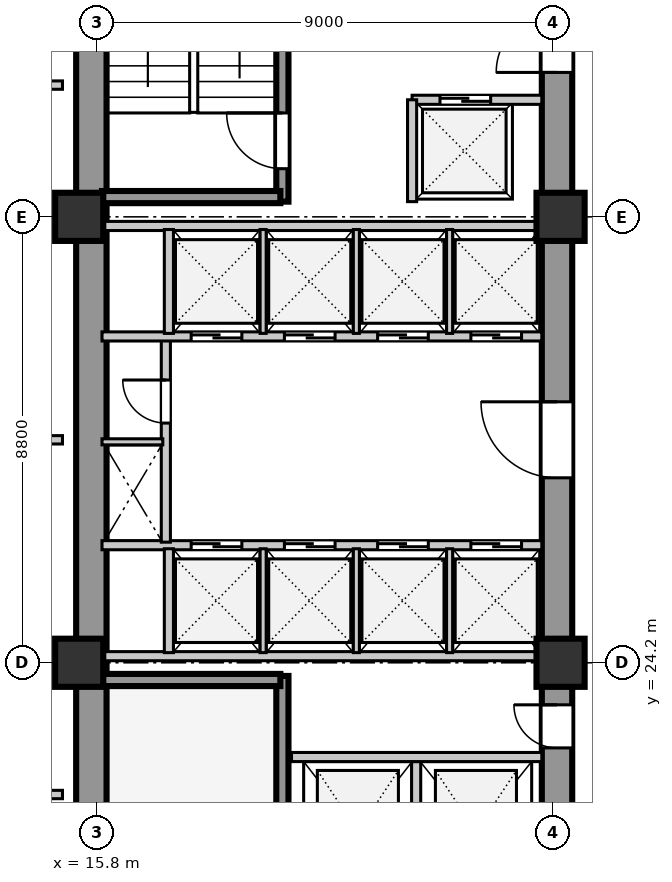
"""IFC4 building model, lengths in metres.
Left out: names, types, materials, properties, quantities, classifications, styles, units other than length and angle.
Written with IfcOpenShell. Run it as: python <this file> out.ifc"""

import sys

from ifc_helpers import new_model, si_unit, direction, frame, frame_2d, origin, origin_2d, place, context, subcontext, project, spatial, rectangle, extrude, element, fill, save


model = new_model("IFC4")
c1 = context("Model", 3, precision=1e-05, world=origin(), true_north=direction((0.0, 1.0)))
c2 = subcontext(c1, "Body", "Model", "MODEL_VIEW")
j1 = project(units=[si_unit("LENGTHUNIT", "METRE"), si_unit("PLANEANGLEUNIT", "RADIAN")], contexts=[c1])
p1 = place(None, origin())
s1 = spatial("IfcSite", under=j1, at=p1, CompositionType="ELEMENT")
p2 = place(p1, origin())
s2 = spatial("IfcBuilding", under=s1, at=p2, CompositionType="ELEMENT")
p3 = place(p2, frame((0.0, 0.0, 17.0)))
s3 = spatial("IfcBuildingStorey", under=s2, at=p3, CompositionType="ELEMENT", Elevation=17.0)
p4 = place(p3, frame((15.69, 15.81, 0.0), z_axis=(0.0, 0.0, 1.0), x_axis=(0.0, 1.0, 0.0)))
e1 = element("IfcWall", 1, at=p4, inside=s3, PredefinedType="SHEAR", context=c2, shape_type="SweptSolid", body=[
    extrude(rectangle(XDim=25.63, YDim=0.6, at=frame_2d((12.815, 0.0))), origin(), (0.0, 0.0, 1.0), 4.22),
])
p5 = place(p3, frame((24.88, 15.74, 0.0), z_axis=(0.0, 0.0, 1.0), x_axis=(0.0, 1.0, 0.0)))
e2 = element("IfcWall", 2, at=p5, inside=s3, PredefinedType="SHEAR", context=c2, shape_type="SweptSolid", body=[
    extrude(rectangle(XDim=25.76, YDim=0.6, at=frame_2d((12.88, 0.0))), origin(), (0.0, 0.0, 1.0), 4.22),
])
p6 = place(p5, frame((1.61, 0.0, 0.0)))
e3 = element("IfcOpeningElement", 3, at=p6, cuts=e2, PredefinedType="OPENING", context=c2, shape_type="SweptSolid", body=[
    extrude(rectangle(XDim=1.2, YDim=2.1, at=frame_2d((0.6, 1.05))), frame((0.0, 0.31, 0.0), z_axis=(0.0, -1.0, 0.0), x_axis=(1.0, 0.0, 0.0)), (0.0, 0.0, 1.0), 0.62),
])
p7 = place(p5, frame((6.78, 0.0, 0.0)))
e4 = element("IfcOpeningElement", 4, at=p7, cuts=e2, PredefinedType="OPENING", context=c2, shape_type="SweptSolid", body=[
    extrude(rectangle(XDim=0.85, YDim=2.06, at=frame_2d((0.425, 1.03))), frame((0.0, 0.31, 0.0), z_axis=(0.0, -1.0, 0.0), x_axis=(1.0, 0.0, 0.0)), (0.0, 0.0, 1.0), 0.62),
])
p8 = place(p5, frame((12.11, 0.0, 0.0)))
e5 = element("IfcOpeningElement", 5, at=p8, cuts=e2, PredefinedType="OPENING", context=c2, shape_type="SweptSolid", body=[
    extrude(rectangle(XDim=1.5, YDim=2.12, at=frame_2d((0.75, 1.06))), frame((0.0, 0.31, 0.0), z_axis=(0.0, -1.0, 0.0), x_axis=(1.0, 0.0, 0.0)), (0.0, 0.0, 1.0), 0.62),
])
p9 = place(p5, frame((20.11, 0.0, 0.0)))
e6 = element("IfcOpeningElement", 6, at=p9, cuts=e2, PredefinedType="OPENING", context=c2, shape_type="SweptSolid", body=[
    extrude(rectangle(XDim=1.2, YDim=2.12, at=frame_2d((0.6, 1.06))), frame((0.0, 0.31, 0.0), z_axis=(0.0, -1.0, 0.0), x_axis=(1.0, 0.0, 0.0)), (0.0, 0.0, 1.0), 0.62),
])
p10 = place(p5, frame((24.01, 0.0, 0.0)))
e7 = element("IfcOpeningElement", 7, at=p10, cuts=e2, PredefinedType="OPENING", context=c2, shape_type="SweptSolid", body=[
    extrude(rectangle(XDim=0.95, YDim=2.1, at=frame_2d((0.475, 1.05))), frame((0.0, 0.31, 0.0), z_axis=(0.0, -1.0, 0.0), x_axis=(1.0, 0.0, 0.0)), (0.0, 0.0, 1.0), 0.62),
])
for number, where, z_axis, x_axis in (
    (8, (15.45, 24.2, 0.0), (0.0, 0.0, 1.0), (1.0, 0.0, 0.0)),
    (9, (15.45, 33.0, 0.0), (0.0, 0.0, 1.0), (1.0, 0.0, 0.0)),
    (10, (24.95, 24.2, 0.0), (0.0, 0.0, 1.0), (1.0, 0.0, 0.0)),
    (11, (24.95, 33.0, 0.0), (0.0, 0.0, 1.0), (1.0, 0.0, 0.0)),
):
    element("IfcColumn", number, at=place(p3, frame(where, z_axis=z_axis, x_axis=x_axis)), inside=s3, PredefinedType="COLUMN", context=c2, shape_type="SweptSolid", body=[
        extrude(rectangle(XDim=0.95, YDim=0.95, at=origin_2d()), origin(), (0.0, 0.0, 1.0), 4.22),
    ])
p11 = place(p3, frame((19.46, 15.74, 0.0), z_axis=(0.0, 0.0, 1.0), x_axis=(0.0, 1.0, 0.0)))
e12 = element("IfcWall", 12, at=p11, inside=s3, PredefinedType="SHEAR", context=c2, shape_type="SweptSolid", body=[
    extrude(rectangle(XDim=8.2, YDim=0.24, at=frame_2d((4.1, 0.0))), origin(), (0.0, 0.0, 1.0), 4.5),
])
p12 = place(p11, frame((0.45, 0.0, 0.0)))
e13 = element("IfcOpeningElement", 13, at=p12, cuts=e12, PredefinedType="OPENING", context=c2, shape_type="SweptSolid", body=[
    extrude(rectangle(XDim=1.1, YDim=2.1, at=frame_2d((0.55, 1.05))), frame((0.0, 0.13, 0.0), z_axis=(0.0, -1.0, 0.0), x_axis=(1.0, 0.0, 0.0)), (0.0, 0.0, 1.0), 0.26),
])
p13 = place(p3, frame((15.9, 23.86, 0.0), z_axis=(0.0, 0.0, 1.0), x_axis=(1.0, 0.0, 0.0)))
e14 = element("IfcWall", 14, at=p13, inside=s3, PredefinedType="SHEAR", context=c2, shape_type="SweptSolid", body=[
    extrude(rectangle(XDim=3.52, YDim=0.24, at=frame_2d((1.76, 0.0))), origin(), (0.0, 0.0, 1.0), 4.5),
])
p14 = place(p3, frame((22.1, 19.51, 0.0), z_axis=(0.0, 0.0, 1.0), x_axis=(0.0, 1.0, 0.0)))
e15 = element("IfcWall", 15, at=p14, inside=s3, PredefinedType="SOLIDWALL", context=c2, shape_type="SweptSolid", body=[
    extrude(rectangle(XDim=2.74, YDim=0.18, at=frame_2d((1.37, 0.0))), origin(), (0.0, 0.0, 1.0), 4.22),
])
p15 = place(p3, frame((19.64, 22.34, 0.0), z_axis=(0.0, 0.0, 1.0), x_axis=(1.0, 0.0, 0.0)))
e16 = element("IfcWall", 16, at=p15, inside=s3, PredefinedType="SOLIDWALL", context=c2, shape_type="SweptSolid", body=[
    extrude(rectangle(XDim=4.94, YDim=0.18, at=frame_2d((2.47, 0.0))), origin(), (0.0, 0.0, 1.0), 4.22),
])
p16 = place(p3, frame((15.9, 26.52, 0.0), z_axis=(0.0, 0.0, 1.0), x_axis=(1.0, 0.0, 0.0)))
e17 = element("IfcWall", 17, at=p16, inside=s3, PredefinedType="SOLIDWALL", context=c2, shape_type="SweptSolid", body=[
    extrude(rectangle(XDim=8.68, YDim=0.18, at=frame_2d((4.34, 0.0))), origin(), (0.0, 0.0, 1.0), 4.22),
])
p17 = place(p16, frame((1.76, 0.0, 0.0)))
e18 = element("IfcOpeningElement", 18, at=p17, cuts=e17, PredefinedType="OPENING", context=c2, shape_type="SweptSolid", body=[
    extrude(rectangle(XDim=1.0, YDim=2.1, at=frame_2d((0.5, 1.05))), frame((0.0, 0.1, 0.0), z_axis=(0.0, -1.0, 0.0), x_axis=(1.0, 0.0, 0.0)), (0.0, 0.0, 1.0), 0.2),
])
p18 = place(p16, frame((3.6, 0.0, 0.0)))
e19 = element("IfcOpeningElement", 19, at=p18, cuts=e17, PredefinedType="OPENING", context=c2, shape_type="SweptSolid", body=[
    extrude(rectangle(XDim=1.0, YDim=2.1, at=frame_2d((0.5, 1.05))), frame((0.0, 0.1, 0.0), z_axis=(0.0, -1.0, 0.0), x_axis=(1.0, 0.0, 0.0)), (0.0, 0.0, 1.0), 0.2),
])
p19 = place(p16, frame((5.44, 0.0, 0.0)))
e20 = element("IfcOpeningElement", 20, at=p19, cuts=e17, PredefinedType="OPENING", context=c2, shape_type="SweptSolid", body=[
    extrude(rectangle(XDim=1.0, YDim=2.1, at=frame_2d((0.5, 1.05))), frame((0.0, 0.1, 0.0), z_axis=(0.0, -1.0, 0.0), x_axis=(1.0, 0.0, 0.0)), (0.0, 0.0, 1.0), 0.2),
])
p20 = place(p16, frame((7.28, 0.0, 0.0)))
e21 = element("IfcOpeningElement", 21, at=p20, cuts=e17, PredefinedType="OPENING", context=c2, shape_type="SweptSolid", body=[
    extrude(rectangle(XDim=1.0, YDim=2.1, at=frame_2d((0.5, 1.05))), frame((0.0, 0.1, 0.0), z_axis=(0.0, -1.0, 0.0), x_axis=(1.0, 0.0, 0.0)), (0.0, 0.0, 1.0), 0.2),
])
p21 = place(p3, frame((15.9, 24.33, 0.0), z_axis=(0.0, 0.0, 1.0), x_axis=(1.0, 0.0, 0.0)))
e22 = element("IfcWall", 22, at=p21, inside=s3, PredefinedType="SOLIDWALL", context=c2, shape_type="SweptSolid", body=[
    extrude(rectangle(XDim=8.68, YDim=0.18, at=frame_2d((4.34, 0.0))), origin(), (0.0, 0.0, 1.0), 3.42),
])
p22 = place(p3, frame((17.22, 24.4, 0.0), z_axis=(0.0, 0.0, 1.0), x_axis=(0.0, 1.0, 0.0)))
e23 = element("IfcWall", 23, at=p22, inside=s3, PredefinedType="SOLIDWALL", context=c2, shape_type="SweptSolid", body=[
    extrude(rectangle(XDim=2.05, YDim=0.18, at=frame_2d((1.025, 0.0))), origin(), (0.0, 0.0, 1.0), 4.22),
])
for number, where, z_axis, x_axis in (
    (24, (19.08, 24.4, 0.0), (0.0, 0.0, 1.0), (0.0, 1.0, 0.0)),
    (25, (20.92, 24.4, 0.0), (0.0, 0.0, 1.0), (0.0, 1.0, 0.0)),
    (26, (22.76, 24.4, 0.0), (0.0, 0.0, 1.0), (0.0, 1.0, 0.0)),
):
    element("IfcWall", number, at=place(p3, frame(where, z_axis=z_axis, x_axis=x_axis)), inside=s3, PredefinedType="PARTITIONING", context=c2, shape_type="SweptSolid", body=[
        extrude(rectangle(XDim=2.05, YDim=0.12, at=frame_2d((1.025, 0.0))), origin(), (0.0, 0.0, 1.0), 4.22),
    ])
p23 = place(p3, frame((17.16, 26.58, 0.0), z_axis=(0.0, 0.0, 1.0), x_axis=(0.0, 1.0, 0.0)))
e27 = element("IfcWall", 27, at=p23, inside=s3, PredefinedType="SOLIDWALL", context=c2, shape_type="SweptSolid", body=[
    extrude(rectangle(XDim=4.02, YDim=0.18, at=frame_2d((2.01, 0.0))), origin(), (0.0, 0.0, 1.0), 4.22),
])
p24 = place(p23, frame((2.35, 0.0, 0.0)))
e28 = element("IfcOpeningElement", 28, at=p24, cuts=e27, PredefinedType="OPENING", context=c2, shape_type="SweptSolid", body=[
    extrude(rectangle(XDim=0.85, YDim=2.06, at=frame_2d((0.425, 1.03))), frame((0.0, 0.1, 0.0), z_axis=(0.0, -1.0, 0.0), x_axis=(1.0, 0.0, 0.0)), (0.0, 0.0, 1.0), 0.2),
])
p25 = place(p3, frame((15.9, 28.56, 0.0), z_axis=(0.0, 0.0, 1.0), x_axis=(1.0, 0.0, 0.0)))
e29 = element("IfcWall", 29, at=p25, inside=s3, PredefinedType="PARTITIONING", context=c2, shape_type="SweptSolid", body=[
    extrude(rectangle(XDim=1.2, YDim=0.12, at=frame_2d((0.6, 0.0))), origin(), (0.0, 0.0, 1.0), 4.22),
])
p26 = place(p3, frame((15.9, 30.64, 0.0), z_axis=(0.0, 0.0, 1.0), x_axis=(1.0, 0.0, 0.0)))
e30 = element("IfcWall", 30, at=p26, inside=s3, PredefinedType="SOLIDWALL", context=c2, shape_type="SweptSolid", body=[
    extrude(rectangle(XDim=8.68, YDim=0.18, at=frame_2d((4.34, 0.0))), origin(), (0.0, 0.0, 1.0), 4.22),
])
p27 = place(p26, frame((1.76, 0.0, 0.0)))
e31 = element("IfcOpeningElement", 31, at=p27, cuts=e30, PredefinedType="OPENING", context=c2, shape_type="SweptSolid", body=[
    extrude(rectangle(XDim=1.0, YDim=2.1, at=frame_2d((0.5, 1.05))), frame((0.0, 0.1, 0.0), z_axis=(0.0, -1.0, 0.0), x_axis=(1.0, 0.0, 0.0)), (0.0, 0.0, 1.0), 0.2),
])
p28 = place(p26, frame((3.6, 0.0, 0.0)))
e32 = element("IfcOpeningElement", 32, at=p28, cuts=e30, PredefinedType="OPENING", context=c2, shape_type="SweptSolid", body=[
    extrude(rectangle(XDim=1.0, YDim=2.1, at=frame_2d((0.5, 1.05))), frame((0.0, 0.1, 0.0), z_axis=(0.0, -1.0, 0.0), x_axis=(1.0, 0.0, 0.0)), (0.0, 0.0, 1.0), 0.2),
])
p29 = place(p26, frame((5.44, 0.0, 0.0)))
e33 = element("IfcOpeningElement", 33, at=p29, cuts=e30, PredefinedType="OPENING", context=c2, shape_type="SweptSolid", body=[
    extrude(rectangle(XDim=1.0, YDim=2.1, at=frame_2d((0.5, 1.05))), frame((0.0, 0.1, 0.0), z_axis=(0.0, -1.0, 0.0), x_axis=(1.0, 0.0, 0.0)), (0.0, 0.0, 1.0), 0.2),
])
p30 = place(p26, frame((7.28, 0.0, 0.0)))
e34 = element("IfcOpeningElement", 34, at=p30, cuts=e30, PredefinedType="OPENING", context=c2, shape_type="SweptSolid", body=[
    extrude(rectangle(XDim=1.0, YDim=2.1, at=frame_2d((0.5, 1.05))), frame((0.0, 0.1, 0.0), z_axis=(0.0, -1.0, 0.0), x_axis=(1.0, 0.0, 0.0)), (0.0, 0.0, 1.0), 0.2),
])
p31 = place(p3, frame((15.9, 32.82, 0.0), z_axis=(0.0, 0.0, 1.0), x_axis=(1.0, 0.0, 0.0)))
e35 = element("IfcWall", 35, at=p31, inside=s3, PredefinedType="SOLIDWALL", context=c2, shape_type="SweptSolid", body=[
    extrude(rectangle(XDim=8.68, YDim=0.18, at=frame_2d((4.34, 0.0))), origin(), (0.0, 0.0, 1.0), 3.42),
])
p32 = place(p3, frame((17.22, 30.7, 0.0), z_axis=(0.0, 0.0, 1.0), x_axis=(0.0, 1.0, 0.0)))
e36 = element("IfcWall", 36, at=p32, inside=s3, PredefinedType="SOLIDWALL", context=c2, shape_type="SweptSolid", body=[
    extrude(rectangle(XDim=2.05, YDim=0.18, at=frame_2d((1.025, 0.0))), origin(), (0.0, 0.0, 1.0), 4.22),
])
for number, where, z_axis, x_axis in (
    (37, (19.08, 30.7, 0.0), (0.0, 0.0, 1.0), (0.0, 1.0, 0.0)),
    (38, (20.92, 30.7, 0.0), (0.0, 0.0, 1.0), (0.0, 1.0, 0.0)),
    (39, (22.76, 30.7, 0.0), (0.0, 0.0, 1.0), (0.0, 1.0, 0.0)),
):
    element("IfcWall", number, at=place(p3, frame(where, z_axis=z_axis, x_axis=x_axis)), inside=s3, PredefinedType="PARTITIONING", context=c2, shape_type="SweptSolid", body=[
        extrude(rectangle(XDim=2.05, YDim=0.12, at=frame_2d((1.025, 0.0))), origin(), (0.0, 0.0, 1.0), 4.22),
    ])
p33 = place(p3, frame((19.46, 33.3, 0.0), z_axis=(0.0, 0.0, 1.0), x_axis=(0.0, 1.0, 0.0)))
e40 = element("IfcWall", 40, at=p33, inside=s3, PredefinedType="SHEAR", context=c2, shape_type="SweptSolid", body=[
    extrude(rectangle(XDim=8.18, YDim=0.24, at=frame_2d((4.09, 0.0))), origin(), (0.0, 0.0, 1.0), 4.5),
])
p34 = place(p33, frame((0.65, 0.0, 0.0)))
e41 = element("IfcOpeningElement", 41, at=p34, cuts=e40, PredefinedType="OPENING", context=c2, shape_type="SweptSolid", body=[
    extrude(rectangle(XDim=1.1, YDim=2.1, at=frame_2d((0.55, 1.05))), frame((0.0, 0.13, 0.0), z_axis=(0.0, -1.0, 0.0), x_axis=(1.0, 0.0, 0.0)), (0.0, 0.0, 1.0), 0.26),
])
p35 = place(p3, frame((15.9, 33.39, 0.0), z_axis=(0.0, 0.0, 1.0), x_axis=(1.0, 0.0, 0.0)))
e42 = element("IfcWall", 42, at=p35, inside=s3, PredefinedType="SHEAR", context=c2, shape_type="SweptSolid", body=[
    extrude(rectangle(XDim=3.52, YDim=0.24, at=frame_2d((1.76, 0.0))), origin(), (0.0, 0.0, 1.0), 4.5),
])
p36 = place(p3, frame((22.02, 35.31, 0.0), z_axis=(0.0, 0.0, 1.0), x_axis=(1.0, 0.0, 0.0)))
e43 = element("IfcWall", 43, at=p36, inside=s3, PredefinedType="SOLIDWALL", context=c2, shape_type="SweptSolid", body=[
    extrude(rectangle(XDim=2.56, YDim=0.18, at=frame_2d((1.28, 0.0))), origin(), (0.0, 0.0, 1.0), 4.22),
])
p37 = place(p36, frame((0.55, 0.0, 0.0)))
e44 = element("IfcOpeningElement", 44, at=p37, cuts=e43, PredefinedType="OPENING", context=c2, shape_type="SweptSolid", body=[
    extrude(rectangle(XDim=1.0, YDim=2.1, at=frame_2d((0.5, 1.05))), frame((0.0, 0.1, 0.0), z_axis=(0.0, -1.0, 0.0), x_axis=(1.0, 0.0, 0.0)), (0.0, 0.0, 1.0), 0.2),
])
p38 = place(p3, frame((22.02, 33.3, 0.0), z_axis=(0.0, 0.0, 1.0), x_axis=(0.0, 1.0, 0.0)))
e45 = element("IfcWall", 45, at=p38, inside=s3, PredefinedType="SOLIDWALL", context=c2, shape_type="SweptSolid", body=[
    extrude(rectangle(XDim=2.01, YDim=0.18, at=frame_2d((1.005, 0.0))), origin(), (0.0, 0.0, 1.0), 4.22),
])
for number, where, z_axis, x_axis in (
    (46, (6.88, 21.6, 0.0), (0.0, 0.0, 1.0), (1.0, 0.0, 0.0)),
    (47, (6.88, 28.6, 0.0), (0.0, 0.0, 1.0), (1.0, 0.0, 0.0)),
    (48, (6.88, 35.6, 0.0), (0.0, 0.0, 1.0), (1.0, 0.0, 0.0)),
):
    element("IfcWall", number, at=place(p3, frame(where, z_axis=z_axis, x_axis=x_axis)), inside=s3, PredefinedType="PARTITIONING", context=c2, shape_type="SweptSolid", body=[
        extrude(rectangle(XDim=8.24, YDim=0.165, at=frame_2d((4.12, 0.0))), origin(), (0.0, 0.0, 1.0), 4.22),
    ])
p39 = place(p7, frame((0.85, 0.0, 0.0), z_axis=(0.0, 0.0, 1.0), x_axis=(-1.0, 0.0, 0.0)))
e49 = element("IfcDoor", 49, at=p39, inside=s3, OperationType="SINGLE_SWING_LEFT", PredefinedType="DOOR", context=c2, shape_type="SweptSolid", body=[
    extrude(rectangle(XDim=0.85, YDim=2.06, at=frame_2d((0.425, 1.03))), frame((0.0, 0.025, 0.0), z_axis=(0.0, -1.0, 0.0), x_axis=(1.0, 0.0, 0.0)), (0.0, 0.0, 1.0), 0.05),
])
fill(e4, e49)
p40 = place(p17, origin())
e50 = element("IfcDoor", 50, at=p40, inside=s3, OperationType="DOUBLE_DOOR_SLIDING", PredefinedType="DOOR", context=c2, shape_type="SweptSolid", body=[
    extrude(rectangle(XDim=1.0, YDim=2.1, at=frame_2d((0.5, 1.05))), frame((0.0, 0.025, 0.0), z_axis=(0.0, -1.0, 0.0), x_axis=(1.0, 0.0, 0.0)), (0.0, 0.0, 1.0), 0.05),
])
fill(e18, e50)
p41 = place(p18, origin())
e51 = element("IfcDoor", 51, at=p41, inside=s3, OperationType="DOUBLE_DOOR_SLIDING", PredefinedType="DOOR", context=c2, shape_type="SweptSolid", body=[
    extrude(rectangle(XDim=1.0, YDim=2.1, at=frame_2d((0.5, 1.05))), frame((0.0, 0.025, 0.0), z_axis=(0.0, -1.0, 0.0), x_axis=(1.0, 0.0, 0.0)), (0.0, 0.0, 1.0), 0.05),
])
fill(e19, e51)
p42 = place(p19, origin())
e52 = element("IfcDoor", 52, at=p42, inside=s3, OperationType="DOUBLE_DOOR_SLIDING", PredefinedType="DOOR", context=c2, shape_type="SweptSolid", body=[
    extrude(rectangle(XDim=1.0, YDim=2.1, at=frame_2d((0.5, 1.05))), frame((0.0, 0.025, 0.0), z_axis=(0.0, -1.0, 0.0), x_axis=(1.0, 0.0, 0.0)), (0.0, 0.0, 1.0), 0.05),
])
fill(e20, e52)
p43 = place(p20, origin())
e53 = element("IfcDoor", 53, at=p43, inside=s3, OperationType="DOUBLE_DOOR_SLIDING", PredefinedType="DOOR", context=c2, shape_type="SweptSolid", body=[
    extrude(rectangle(XDim=1.0, YDim=2.1, at=frame_2d((0.5, 1.05))), frame((0.0, 0.025, 0.0), z_axis=(0.0, -1.0, 0.0), x_axis=(1.0, 0.0, 0.0)), (0.0, 0.0, 1.0), 0.05),
])
fill(e21, e53)
p44 = place(p24, origin())
e54 = element("IfcDoor", 54, at=p44, inside=s3, OperationType="SINGLE_SWING_RIGHT", PredefinedType="DOOR", context=c2, shape_type="SweptSolid", body=[
    extrude(rectangle(XDim=0.85, YDim=2.06, at=frame_2d((0.425, 1.03))), frame((0.0, 0.025, 0.0), z_axis=(0.0, -1.0, 0.0), x_axis=(1.0, 0.0, 0.0)), (0.0, 0.0, 1.0), 0.05),
])
fill(e28, e54)
p45 = place(p8, frame((1.5, 0.0, 0.0), z_axis=(0.0, 0.0, 1.0), x_axis=(-1.0, 0.0, 0.0)))
e55 = element("IfcDoor", 55, at=p45, inside=s3, OperationType="SINGLE_SWING_LEFT", PredefinedType="DOOR", context=c2, shape_type="SweptSolid", body=[
    extrude(rectangle(XDim=1.5, YDim=2.12, at=frame_2d((0.75, 1.06))), frame((0.0, 0.025, 0.0), z_axis=(0.0, -1.0, 0.0), x_axis=(1.0, 0.0, 0.0)), (0.0, 0.0, 1.0), 0.05),
])
fill(e5, e55)
p46 = place(p27, frame((1.0, 0.0, 0.0), z_axis=(0.0, 0.0, 1.0), x_axis=(-1.0, 0.0, 0.0)))
e56 = element("IfcDoor", 56, at=p46, inside=s3, OperationType="DOUBLE_DOOR_SLIDING", PredefinedType="DOOR", context=c2, shape_type="SweptSolid", body=[
    extrude(rectangle(XDim=1.0, YDim=2.1, at=frame_2d((0.5, 1.05))), frame((0.0, 0.025, 0.0), z_axis=(0.0, -1.0, 0.0), x_axis=(1.0, 0.0, 0.0)), (0.0, 0.0, 1.0), 0.05),
])
fill(e31, e56)
p47 = place(p28, frame((1.0, 0.0, 0.0), z_axis=(0.0, 0.0, 1.0), x_axis=(-1.0, 0.0, 0.0)))
e57 = element("IfcDoor", 57, at=p47, inside=s3, OperationType="DOUBLE_DOOR_SLIDING", PredefinedType="DOOR", context=c2, shape_type="SweptSolid", body=[
    extrude(rectangle(XDim=1.0, YDim=2.1, at=frame_2d((0.5, 1.05))), frame((0.0, 0.025, 0.0), z_axis=(0.0, -1.0, 0.0), x_axis=(1.0, 0.0, 0.0)), (0.0, 0.0, 1.0), 0.05),
])
fill(e32, e57)
p48 = place(p29, frame((1.0, 0.0, 0.0), z_axis=(0.0, 0.0, 1.0), x_axis=(-1.0, 0.0, 0.0)))
e58 = element("IfcDoor", 58, at=p48, inside=s3, OperationType="DOUBLE_DOOR_SLIDING", PredefinedType="DOOR", context=c2, shape_type="SweptSolid", body=[
    extrude(rectangle(XDim=1.0, YDim=2.1, at=frame_2d((0.5, 1.05))), frame((0.0, 0.025, 0.0), z_axis=(0.0, -1.0, 0.0), x_axis=(1.0, 0.0, 0.0)), (0.0, 0.0, 1.0), 0.05),
])
fill(e33, e58)
p49 = place(p30, frame((1.0, 0.0, 0.0), z_axis=(0.0, 0.0, 1.0), x_axis=(-1.0, 0.0, 0.0)))
e59 = element("IfcDoor", 59, at=p49, inside=s3, OperationType="DOUBLE_DOOR_SLIDING", PredefinedType="DOOR", context=c2, shape_type="SweptSolid", body=[
    extrude(rectangle(XDim=1.0, YDim=2.1, at=frame_2d((0.5, 1.05))), frame((0.0, 0.025, 0.0), z_axis=(0.0, -1.0, 0.0), x_axis=(1.0, 0.0, 0.0)), (0.0, 0.0, 1.0), 0.05),
])
fill(e34, e59)
p50 = place(p34, origin())
e60 = element("IfcDoor", 60, at=p50, inside=s3, OperationType="SINGLE_SWING_RIGHT", PredefinedType="DOOR", context=c2, shape_type="SweptSolid", body=[
    extrude(rectangle(XDim=1.1, YDim=2.1, at=frame_2d((0.55, 1.05))), frame((0.0, 0.025, 0.0), z_axis=(0.0, -1.0, 0.0), x_axis=(1.0, 0.0, 0.0)), (0.0, 0.0, 1.0), 0.05),
])
fill(e41, e60)
p51 = place(p9, frame((1.2, 0.0, 0.0), z_axis=(0.0, 0.0, 1.0), x_axis=(-1.0, 0.0, 0.0)))
e61 = element("IfcDoor", 61, at=p51, inside=s3, OperationType="SINGLE_SWING_RIGHT", PredefinedType="DOOR", context=c2, shape_type="SweptSolid", body=[
    extrude(rectangle(XDim=1.2, YDim=2.12, at=frame_2d((0.6, 1.06))), frame((0.0, 0.025, 0.0), z_axis=(0.0, -1.0, 0.0), x_axis=(1.0, 0.0, 0.0)), (0.0, 0.0, 1.0), 0.05),
])
fill(e6, e61)
p52 = place(p37, origin())
e62 = element("IfcDoor", 62, at=p52, inside=s3, OperationType="DOUBLE_DOOR_SLIDING", PredefinedType="DOOR", context=c2, shape_type="SweptSolid", body=[
    extrude(rectangle(XDim=1.0, YDim=2.1, at=frame_2d((0.5, 1.05))), frame((0.0, 0.025, 0.0), z_axis=(0.0, -1.0, 0.0), x_axis=(1.0, 0.0, 0.0)), (0.0, 0.0, 1.0), 0.05),
])
fill(e44, e62)
save(model, sys.argv[1])
